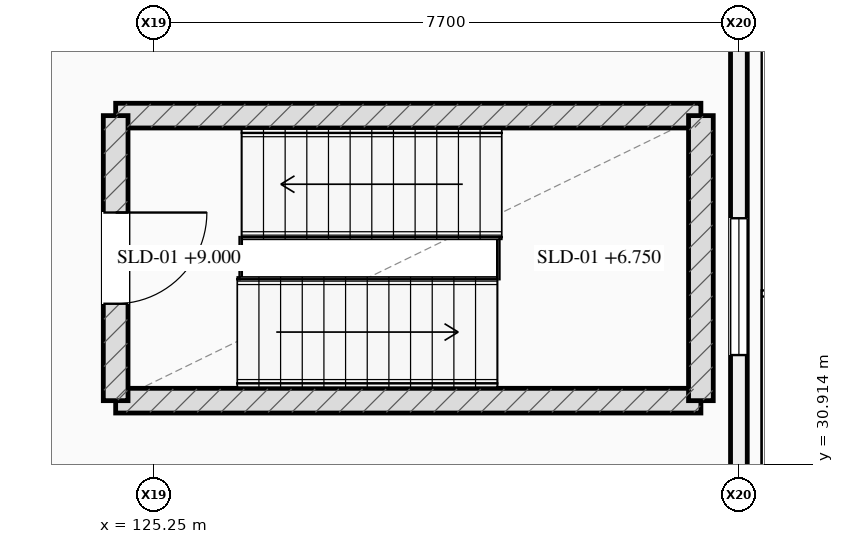
"""IFC4 building model, lengths in metres.
Left out: names, types, materials, properties, quantities, classifications, styles, units other than length and angle.
Written with IfcOpenShell. Run it as: python <this file> out.ifc"""

import sys

from ifc_helpers import new_model, si_unit, direction, frame, frame_2d, origin, place, context, subcontext, project, spatial, rectangle, extrude, element, fill, save


model = new_model("IFC4")
c1 = context("Model", 3, precision=1e-05, world=origin(), true_north=direction((0.0, 1.0)))
c2 = subcontext(c1, "Body", "Model", "MODEL_VIEW")
j1 = project(units=[si_unit("LENGTHUNIT", "METRE"), si_unit("PLANEANGLEUNIT", "RADIAN")], contexts=[c1])
p1 = place(None, origin())
s1 = spatial("IfcSite", under=j1, at=p1, CompositionType="ELEMENT")
p2 = place(p1, origin())
s2 = spatial("IfcBuilding", under=s1, at=p2, CompositionType="ELEMENT")
p3 = place(p2, frame((0.0, 0.0, 4.5)))
s3 = spatial("IfcBuildingStorey", under=s2, at=p3, CompositionType="ELEMENT", Elevation=4.5)
p4 = place(p3, frame((132.95, 36.4, 0.0), z_axis=(0.0, 0.0, 1.0), x_axis=(0.0, -1.0, 0.0)))
e1 = element("IfcWall", 1, at=p4, inside=s3, PredefinedType="STANDARD", context=c2, shape_type="SweptSolid", body=[
    extrude(rectangle(XDim=6.3, YDim=0.22, at=frame_2d((3.15, 0.0))), origin(), (0.0, 0.0, 1.0), 3.24),
])
p5 = place(p4, frame((2.25, 0.0, 0.95)))
e2 = element("IfcOpeningElement", 2, at=p5, cuts=e1, PredefinedType="OPENING", context=c2, shape_type="SweptSolid", body=[
    extrude(rectangle(XDim=1.8, YDim=1.4, at=frame_2d((0.9, 0.7))), frame((0.0, 0.12, 0.0), z_axis=(0.0, -1.0, 0.0), x_axis=(1.0, 0.0, 0.0)), (0.0, 0.0, 1.0), 0.24),
])
for number, where, z_axis, x_axis in (
    (3, (124.75, 31.75, 0.0), (0.0, 0.0, 1.0), (1.0, 0.0, 0.0)),
    (4, (132.45, 35.5, 0.0), (0.0, 0.0, 1.0), (-1.0, 0.0, 0.0)),
):
    element("IfcWall", number, at=place(p3, frame(where, z_axis=z_axis, x_axis=x_axis)), inside=s3, PredefinedType="SHEAR", context=c2, shape_type="SweptSolid", body=[
        extrude(rectangle(XDim=7.7, YDim=0.325, at=frame_2d((3.85, 0.0))), origin(), (0.0, 0.0, 1.0), 4.25),
    ])
p6 = place(p3, frame((124.75, 35.5, 0.0), z_axis=(0.0, 0.0, 1.0), x_axis=(0.0, -1.0, 0.0)))
e5 = element("IfcWall", 5, at=p6, inside=s3, PredefinedType="SHEAR", context=c2, shape_type="SweptSolid", body=[
    extrude(rectangle(XDim=3.75, YDim=0.325, at=frame_2d((1.875, 0.0))), origin(), (0.0, 0.0, 1.0), 4.25),
])
p7 = place(p6, frame((1.275, 0.0, 0.0)))
e6 = element("IfcOpeningElement", 6, at=p7, cuts=e5, PredefinedType="OPENING", context=c2, shape_type="SweptSolid", body=[
    extrude(rectangle(XDim=1.2, YDim=2.2, at=frame_2d((0.6, 1.1))), frame((0.0, 0.172, 0.0), z_axis=(0.0, -1.0, 0.0), x_axis=(1.0, 0.0, 0.0)), (0.0, 0.0, 1.0), 0.345),
])
p8 = place(p3, frame((132.45, 31.75, 0.0), z_axis=(0.0, 0.0, 1.0), x_axis=(0.0, 1.0, 0.0)))
e7 = element("IfcWall", 7, at=p8, inside=s3, PredefinedType="SHEAR", context=c2, shape_type="SweptSolid", body=[
    extrude(rectangle(XDim=3.75, YDim=0.325, at=frame_2d((1.875, 0.0))), origin(), (0.0, 0.0, 1.0), 4.25),
])
p9 = place(p5, origin())
e8 = element("IfcWindow", 8, at=p9, inside=s3, PartitioningType="SINGLE_PANEL", PredefinedType="WINDOW", context=c2, shape_type="SweptSolid", body=[
    extrude(rectangle(XDim=1.8, YDim=1.4, at=frame_2d((0.9, 0.7))), frame((0.0, 0.03, 0.0), z_axis=(0.0, -1.0, 0.0), x_axis=(1.0, 0.0, 0.0)), (0.0, 0.0, 1.0), 0.06),
])
fill(e2, e8)
p10 = place(p7, origin())
e9 = element("IfcDoor", 9, at=p10, inside=s3, OperationType="SINGLE_SWING_LEFT", PredefinedType="DOOR", context=c2, shape_type="SweptSolid", body=[
    extrude(rectangle(XDim=1.2, YDim=2.2, at=frame_2d((0.6, 1.1))), frame((0.0, 0.025, 0.0), z_axis=(0.0, -1.0, 0.0), x_axis=(1.0, 0.0, 0.0)), (0.0, 0.0, 1.0), 0.05),
])
fill(e6, e9)
save(model, sys.argv[1])
